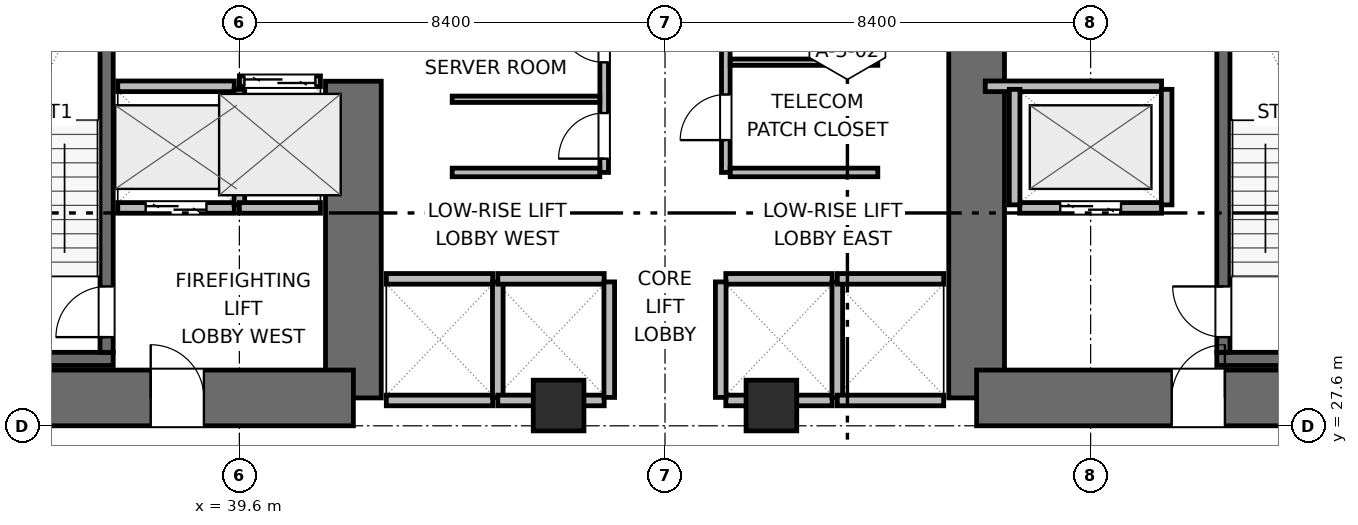
"""IFC4 building model, lengths in metres.
Left out: names, types, materials, properties, quantities, classifications, styles, units other than length and angle.
Written with IfcOpenShell. Run it as: python <this file> out.ifc"""

import sys

from ifc_helpers import new_model, si_unit, direction, frame, frame_2d, origin, origin_2d, place, context, subcontext, project, spatial, rectangle, extrude, element, fill, save


model = new_model("IFC4")
c1 = context("Model", 3, precision=1e-05, world=origin(), true_north=direction((0.0, 1.0)))
c2 = subcontext(c1, "Body", "Model", "MODEL_VIEW")
j1 = project(units=[si_unit("LENGTHUNIT", "METRE"), si_unit("PLANEANGLEUNIT", "RADIAN")], contexts=[c1])
p1 = place(None, origin())
s1 = spatial("IfcSite", under=j1, at=p1, CompositionType="ELEMENT")
p2 = place(p1, origin())
s2 = spatial("IfcBuilding", under=s1, at=p2, CompositionType="ELEMENT")
p3 = place(p2, frame((0.0, 0.0, 12.9)))
s3 = spatial("IfcBuildingStorey", under=s2, at=p3, CompositionType="ELEMENT", Elevation=12.9)
p4 = place(p3, frame((41.85, 28.15, 0.0), z_axis=(0.0, 0.0, 1.0), x_axis=(0.0, 1.0, 0.0)))
e1 = element("IfcWall", 1, at=p4, inside=s3, PredefinedType="SHEAR", context=c2, shape_type="SweptSolid", body=[
    extrude(rectangle(XDim=6.25, YDim=1.1, at=frame_2d((3.125, 0.0))), origin(), (0.0, 0.0, 1.0), 4.2),
])
p5 = place(p3, frame((32.95, 28.15, 0.0), z_axis=(0.0, 0.0, 1.0), x_axis=(1.0, 0.0, 0.0)))
e2 = element("IfcWall", 2, at=p5, inside=s3, PredefinedType="SHEAR", context=c2, shape_type="SweptSolid", body=[
    extrude(rectangle(XDim=8.9, YDim=1.1, at=frame_2d((4.45, 0.0))), origin(), (0.0, 0.0, 1.0), 4.2),
])
p6 = place(p5, frame((4.9, 0.0, 0.0)))
e3 = element("IfcOpeningElement", 3, at=p6, cuts=e2, PredefinedType="OPENING", context=c2, shape_type="SweptSolid", body=[
    extrude(rectangle(XDim=1.05, YDim=2.04, at=frame_2d((0.525, 1.02))), frame((0.0, 0.56, 0.0), z_axis=(0.0, -1.0, 0.0), x_axis=(1.0, 0.0, 0.0)), (0.0, 0.0, 1.0), 1.12),
])
p7 = place(p3, frame((54.15, 28.15, 0.0), z_axis=(0.0, 0.0, 1.0), x_axis=(0.0, 1.0, 0.0)))
e4 = element("IfcWall", 4, at=p7, inside=s3, PredefinedType="SHEAR", context=c2, shape_type="SweptSolid", body=[
    extrude(rectangle(XDim=7.65, YDim=1.1, at=frame_2d((3.825, 0.0))), origin(), (0.0, 0.0, 1.0), 4.2),
])
p8 = place(p3, frame((54.15, 28.15, 0.0), z_axis=(0.0, 0.0, 1.0), x_axis=(1.0, 0.0, 0.0)))
e5 = element("IfcWall", 5, at=p8, inside=s3, PredefinedType="SHEAR", context=c2, shape_type="SweptSolid", body=[
    extrude(rectangle(XDim=8.9, YDim=1.1, at=frame_2d((4.45, 0.0))), origin(), (0.0, 0.0, 1.0), 4.2),
])
p9 = place(p8, frame((3.85, 0.0, 0.0)))
e6 = element("IfcOpeningElement", 6, at=p9, cuts=e5, PredefinedType="OPENING", context=c2, shape_type="SweptSolid", body=[
    extrude(rectangle(XDim=1.05, YDim=2.04, at=frame_2d((0.525, 1.02))), frame((0.0, 0.56, 0.0), z_axis=(0.0, -1.0, 0.0), x_axis=(1.0, 0.0, 0.0)), (0.0, 0.0, 1.0), 1.12),
])
p10 = place(p3, frame((33.5, 28.92, 0.0), z_axis=(0.0, 0.0, 1.0), x_axis=(1.0, 0.0, 0.0)))
e7 = element("IfcWall", 7, at=p10, inside=s3, PredefinedType="SHEAR", context=c2, shape_type="SweptSolid", body=[
    extrude(rectangle(XDim=3.61, YDim=0.26, at=frame_2d((1.805, 0.0))), origin(), (0.0, 0.0, 1.0), 4.2),
])
p11 = place(p3, frame((36.98, 29.05, 0.0), z_axis=(0.0, 0.0, 1.0), x_axis=(0.0, 1.0, 0.0)))
e8 = element("IfcWall", 8, at=p11, inside=s3, PredefinedType="SHEAR", context=c2, shape_type="SweptSolid", body=[
    extrude(rectangle(XDim=7.6, YDim=0.26, at=frame_2d((3.8, 0.0))), origin(), (0.0, 0.0, 1.0), 4.2),
])
p12 = place(p11, frame((0.3, 0.0, 0.0)))
e9 = element("IfcOpeningElement", 9, at=p12, cuts=e8, PredefinedType="OPENING", context=c2, shape_type="SweptSolid", body=[
    extrude(rectangle(XDim=1.0, YDim=2.04, at=frame_2d((0.5, 1.02))), frame((0.0, 0.14, 0.0), z_axis=(0.0, -1.0, 0.0), x_axis=(1.0, 0.0, 0.0)), (0.0, 0.0, 1.0), 0.28),
])
p13 = place(p3, frame((58.89, 28.92, 0.0), z_axis=(0.0, 0.0, 1.0), x_axis=(1.0, 0.0, 0.0)))
e10 = element("IfcWall", 10, at=p13, inside=s3, PredefinedType="SHEAR", context=c2, shape_type="SweptSolid", body=[
    extrude(rectangle(XDim=3.61, YDim=0.26, at=frame_2d((1.805, 0.0))), origin(), (0.0, 0.0, 1.0), 4.2),
])
p14 = place(p3, frame((59.02, 29.05, 0.0), z_axis=(0.0, 0.0, 1.0), x_axis=(0.0, 1.0, 0.0)))
e11 = element("IfcWall", 11, at=p14, inside=s3, PredefinedType="SHEAR", context=c2, shape_type="SweptSolid", body=[
    extrude(rectangle(XDim=7.6, YDim=0.26, at=frame_2d((3.8, 0.0))), origin(), (0.0, 0.0, 1.0), 4.2),
])
p15 = place(p14, frame((0.3, 0.0, 0.0)))
e12 = element("IfcOpeningElement", 12, at=p15, cuts=e11, PredefinedType="OPENING", context=c2, shape_type="SweptSolid", body=[
    extrude(rectangle(XDim=1.0, YDim=2.04, at=frame_2d((0.5, 1.02))), frame((0.0, 0.14, 0.0), z_axis=(0.0, -1.0, 0.0), x_axis=(1.0, 0.0, 0.0)), (0.0, 0.0, 1.0), 0.28),
])
for number, where, z_axis, x_axis in (
    (13, (45.9, 28.0, 0.0), (0.0, 0.0, 1.0), (1.0, 0.0, 0.0)),
    (14, (50.1, 28.0, 0.0), (0.0, 0.0, 1.0), (1.0, 0.0, 0.0)),
):
    element("IfcColumn", number, at=place(p3, frame(where, z_axis=z_axis, x_axis=x_axis)), inside=s3, PredefinedType="COLUMN", context=c2, shape_type="SweptSolid", body=[
        extrude(rectangle(XDim=1.0, YDim=1.0, at=origin_2d()), origin(), (0.0, 0.0, 1.0), 4.2),
    ])
p16 = place(p3, frame((37.2, 31.9, 0.0), z_axis=(0.0, 0.0, 1.0), x_axis=(1.0, 0.0, 0.0)))
e15 = element("IfcWall", 15, at=p16, inside=s3, PredefinedType="PARTITIONING", context=c2, shape_type="SweptSolid", body=[
    extrude(rectangle(XDim=2.3, YDim=0.21, at=frame_2d((1.15, 0.0))), origin(), (0.0, 0.0, 1.0), 3.84),
])
p17 = place(p16, frame((0.55, 0.0, 0.0)))
e16 = element("IfcOpeningElement", 16, at=p17, cuts=e15, PredefinedType="OPENING", context=c2, shape_type="SweptSolid", body=[
    extrude(rectangle(XDim=1.2, YDim=2.04, at=frame_2d((0.6, 1.02))), frame((0.0, 0.115, 0.0), z_axis=(0.0, -1.0, 0.0), x_axis=(1.0, 0.0, 0.0)), (0.0, 0.0, 1.0), 0.23),
])
p18 = place(p3, frame((37.2, 34.3, 0.0), z_axis=(0.0, 0.0, 1.0), x_axis=(1.0, 0.0, 0.0)))
e17 = element("IfcWall", 17, at=p18, inside=s3, PredefinedType="PARTITIONING", context=c2, shape_type="SweptSolid", body=[
    extrude(rectangle(XDim=2.3, YDim=0.21, at=frame_2d((1.15, 0.0))), origin(), (0.0, 0.0, 1.0), 3.84),
])
p19 = place(p3, frame((39.6, 31.96, 0.0), z_axis=(0.0, 0.0, 1.0), x_axis=(0.0, 1.0, 0.0)))
e18 = element("IfcWall", 18, at=p19, inside=s3, PredefinedType="PARTITIONING", context=c2, shape_type="SweptSolid", body=[
    extrude(rectangle(XDim=2.28, YDim=0.21, at=frame_2d((1.14, 0.0))), origin(), (0.0, 0.0, 1.0), 3.84),
])
p20 = place(p3, frame((55.0, 31.9, 0.0), z_axis=(0.0, 0.0, 1.0), x_axis=(1.0, 0.0, 0.0)))
e19 = element("IfcWall", 19, at=p20, inside=s3, PredefinedType="PARTITIONING", context=c2, shape_type="SweptSolid", body=[
    extrude(rectangle(XDim=2.8, YDim=0.21, at=frame_2d((1.4, 0.0))), origin(), (0.0, 0.0, 1.0), 3.84),
])
p21 = place(p20, frame((0.8, 0.0, 0.0)))
e20 = element("IfcOpeningElement", 20, at=p21, cuts=e19, PredefinedType="OPENING", context=c2, shape_type="SweptSolid", body=[
    extrude(rectangle(XDim=1.2, YDim=2.04, at=frame_2d((0.6, 1.02))), frame((0.0, 0.115, 0.0), z_axis=(0.0, -1.0, 0.0), x_axis=(1.0, 0.0, 0.0)), (0.0, 0.0, 1.0), 0.23),
])
p22 = place(p3, frame((54.32, 34.3, 0.0), z_axis=(0.0, 0.0, 1.0), x_axis=(1.0, 0.0, 0.0)))
e21 = element("IfcWall", 21, at=p22, inside=s3, PredefinedType="PARTITIONING", context=c2, shape_type="SweptSolid", body=[
    extrude(rectangle(XDim=3.48, YDim=0.21, at=frame_2d((1.74, 0.0))), origin(), (0.0, 0.0, 1.0), 3.84),
])
for number, where, z_axis, x_axis in (
    (22, (54.9, 31.96, 0.0), (0.0, 0.0, 1.0), (0.0, 1.0, 0.0)),
    (23, (57.9, 31.96, 0.0), (0.0, 0.0, 1.0), (0.0, 1.0, 0.0)),
):
    element("IfcWall", number, at=place(p3, frame(where, z_axis=z_axis, x_axis=x_axis)), inside=s3, PredefinedType="PARTITIONING", context=c2, shape_type="SweptSolid", body=[
        extrude(rectangle(XDim=2.28, YDim=0.21, at=frame_2d((1.14, 0.0))), origin(), (0.0, 0.0, 1.0), 3.84),
    ])
p23 = place(p3, frame((39.6, 34.4, 0.0), z_axis=(0.0, 0.0, 1.0), x_axis=(1.0, 0.0, 0.0)))
e24 = element("IfcWall", 24, at=p23, inside=s3, PredefinedType="PARTITIONING", context=c2, shape_type="SweptSolid", body=[
    extrude(rectangle(XDim=1.6, YDim=0.21, at=frame_2d((0.8, 0.0))), origin(), (0.0, 0.0, 1.0), 3.84),
])
p24 = place(p23, frame((0.1, 0.0, 0.0)))
e25 = element("IfcOpeningElement", 25, at=p24, cuts=e24, PredefinedType="OPENING", context=c2, shape_type="SweptSolid", body=[
    extrude(rectangle(XDim=1.4, YDim=2.06, at=frame_2d((0.7, 1.03))), frame((0.0, 0.115, 0.0), z_axis=(0.0, -1.0, 0.0), x_axis=(1.0, 0.0, 0.0)), (0.0, 0.0, 1.0), 0.23),
])
p25 = place(p3, frame((39.6, 31.9, 0.0), z_axis=(0.0, 0.0, 1.0), x_axis=(1.0, 0.0, 0.0)))
e26 = element("IfcWall", 26, at=p25, inside=s3, PredefinedType="PARTITIONING", context=c2, shape_type="SweptSolid", body=[
    extrude(rectangle(XDim=1.6, YDim=0.21, at=frame_2d((0.8, 0.0))), origin(), (0.0, 0.0, 1.0), 3.84),
])
p26 = place(p3, frame((42.5, 30.5, 0.0), z_axis=(0.0, 0.0, 1.0), x_axis=(1.0, 0.0, 0.0)))
e27 = element("IfcWall", 27, at=p26, inside=s3, PredefinedType="PARTITIONING", context=c2, shape_type="SweptSolid", body=[
    extrude(rectangle(XDim=2.1, YDim=0.21, at=frame_2d((1.05, 0.0))), origin(), (0.0, 0.0, 1.0), 3.84),
])
p27 = place(p3, frame((42.5, 28.1, 0.0), z_axis=(0.0, 0.0, 1.0), x_axis=(1.0, 0.0, 0.0)))
e28 = element("IfcWall", 28, at=p27, inside=s3, PredefinedType="PARTITIONING", context=c2, shape_type="SweptSolid", body=[
    extrude(rectangle(XDim=2.1, YDim=0.21, at=frame_2d((1.05, 0.0))), origin(), (0.0, 0.0, 1.0), 2.725),
])
p28 = place(p3, frame((44.7, 28.16, 0.0), z_axis=(0.0, 0.0, 1.0), x_axis=(0.0, 1.0, 0.0)))
e29 = element("IfcWall", 29, at=p28, inside=s3, PredefinedType="PARTITIONING", context=c2, shape_type="SweptSolid", body=[
    extrude(rectangle(XDim=2.28, YDim=0.21, at=frame_2d((1.14, 0.0))), origin(), (0.0, 0.0, 1.0), 3.84),
])
p29 = place(p3, frame((44.7, 30.5, 0.0), z_axis=(0.0, 0.0, 1.0), x_axis=(1.0, 0.0, 0.0)))
e30 = element("IfcWall", 30, at=p29, inside=s3, PredefinedType="PARTITIONING", context=c2, shape_type="SweptSolid", body=[
    extrude(rectangle(XDim=2.1, YDim=0.21, at=frame_2d((1.05, 0.0))), origin(), (0.0, 0.0, 1.0), 3.84),
])
p30 = place(p3, frame((44.7, 28.1, 0.0), z_axis=(0.0, 0.0, 1.0), x_axis=(1.0, 0.0, 0.0)))
e31 = element("IfcWall", 31, at=p30, inside=s3, PredefinedType="PARTITIONING", context=c2, shape_type="SweptSolid", body=[
    extrude(rectangle(XDim=2.1, YDim=0.21, at=frame_2d((1.05, 0.0))), origin(), (0.0, 0.0, 1.0), 2.725),
])
p31 = place(p3, frame((46.9, 28.16, 0.0), z_axis=(0.0, 0.0, 1.0), x_axis=(0.0, 1.0, 0.0)))
e32 = element("IfcWall", 32, at=p31, inside=s3, PredefinedType="PARTITIONING", context=c2, shape_type="SweptSolid", body=[
    extrude(rectangle(XDim=2.28, YDim=0.21, at=frame_2d((1.14, 0.0))), origin(), (0.0, 0.0, 1.0), 3.84),
])
p32 = place(p3, frame((49.2, 30.5, 0.0), z_axis=(0.0, 0.0, 1.0), x_axis=(1.0, 0.0, 0.0)))
e33 = element("IfcWall", 33, at=p32, inside=s3, PredefinedType="PARTITIONING", context=c2, shape_type="SweptSolid", body=[
    extrude(rectangle(XDim=2.1, YDim=0.21, at=frame_2d((1.05, 0.0))), origin(), (0.0, 0.0, 1.0), 3.84),
])
p33 = place(p3, frame((49.2, 28.1, 0.0), z_axis=(0.0, 0.0, 1.0), x_axis=(1.0, 0.0, 0.0)))
e34 = element("IfcWall", 34, at=p33, inside=s3, PredefinedType="PARTITIONING", context=c2, shape_type="SweptSolid", body=[
    extrude(rectangle(XDim=2.1, YDim=0.21, at=frame_2d((1.05, 0.0))), origin(), (0.0, 0.0, 1.0), 2.725),
])
for number, where, z_axis, x_axis in (
    (35, (49.1, 28.16, 0.0), (0.0, 0.0, 1.0), (0.0, 1.0, 0.0)),
    (36, (51.4, 28.16, 0.0), (0.0, 0.0, 1.0), (0.0, 1.0, 0.0)),
):
    element("IfcWall", number, at=place(p3, frame(where, z_axis=z_axis, x_axis=x_axis)), inside=s3, PredefinedType="PARTITIONING", context=c2, shape_type="SweptSolid", body=[
        extrude(rectangle(XDim=2.28, YDim=0.21, at=frame_2d((1.14, 0.0))), origin(), (0.0, 0.0, 1.0), 3.84),
    ])
p34 = place(p3, frame((51.4, 30.5, 0.0), z_axis=(0.0, 0.0, 1.0), x_axis=(1.0, 0.0, 0.0)))
e37 = element("IfcWall", 37, at=p34, inside=s3, PredefinedType="PARTITIONING", context=c2, shape_type="SweptSolid", body=[
    extrude(rectangle(XDim=2.1, YDim=0.21, at=frame_2d((1.05, 0.0))), origin(), (0.0, 0.0, 1.0), 3.84),
])
p35 = place(p3, frame((51.4, 28.1, 0.0), z_axis=(0.0, 0.0, 1.0), x_axis=(1.0, 0.0, 0.0)))
e38 = element("IfcWall", 38, at=p35, inside=s3, PredefinedType="PARTITIONING", context=c2, shape_type="SweptSolid", body=[
    extrude(rectangle(XDim=2.1, YDim=0.21, at=frame_2d((1.05, 0.0))), origin(), (0.0, 0.0, 1.0), 2.725),
])
p36 = place(p3, frame((46.8, 32.6, 0.0), z_axis=(0.0, 0.0, 1.0), x_axis=(0.0, 1.0, 0.0)))
e39 = element("IfcWall", 39, at=p36, inside=s3, PredefinedType="PARTITIONING", context=c2, shape_type="SweptSolid", body=[
    extrude(rectangle(XDim=3.8, YDim=0.17, at=frame_2d((1.9, 0.0))), origin(), (0.0, 0.0, 1.0), 3.84),
])
p37 = place(p36, frame((0.272, 0.0, 0.0)))
e40 = element("IfcOpeningElement", 40, at=p37, cuts=e39, PredefinedType="OPENING", context=c2, shape_type="SweptSolid", body=[
    extrude(rectangle(XDim=0.9, YDim=2.02, at=frame_2d((0.45, 1.01))), frame((0.0, 0.095, 0.0), z_axis=(0.0, -1.0, 0.0), x_axis=(1.0, 0.0, 0.0)), (0.0, 0.0, 1.0), 0.19),
])
p38 = place(p36, frame((2.172, 0.0, 0.0)))
e41 = element("IfcOpeningElement", 41, at=p38, cuts=e39, PredefinedType="OPENING", context=c2, shape_type="SweptSolid", body=[
    extrude(rectangle(XDim=0.9, YDim=2.02, at=frame_2d((0.45, 1.01))), frame((0.0, 0.095, 0.0), z_axis=(0.0, -1.0, 0.0), x_axis=(1.0, 0.0, 0.0)), (0.0, 0.0, 1.0), 0.19),
])
p39 = place(p3, frame((43.8, 32.6, 0.0), z_axis=(0.0, 0.0, 1.0), x_axis=(1.0, 0.0, 0.0)))
e42 = element("IfcWall", 42, at=p39, inside=s3, PredefinedType="PARTITIONING", context=c2, shape_type="SweptSolid", body=[
    extrude(rectangle(XDim=2.913, YDim=0.17, at=frame_2d((1.457, 0.0))), origin(), (0.0, 0.0, 1.0), 3.84),
])
p40 = place(p3, frame((43.8, 34.044, 0.0), z_axis=(0.0, 0.0, 1.0), x_axis=(1.0, 0.0, 0.0)))
e43 = element("IfcWall", 43, at=p40, inside=s3, PredefinedType="PARTITIONING", context=c2, shape_type="SweptSolid", body=[
    extrude(rectangle(XDim=2.913, YDim=0.125, at=frame_2d((1.457, 0.0))), origin(), (0.0, 0.0, 1.0), 3.84),
])
p41 = place(p3, frame((49.2, 32.6, 0.0), z_axis=(0.0, 0.0, 1.0), x_axis=(0.0, 1.0, 0.0)))
e44 = element("IfcWall", 44, at=p41, inside=s3, PredefinedType="PARTITIONING", context=c2, shape_type="SweptSolid", body=[
    extrude(rectangle(XDim=3.4, YDim=0.17, at=frame_2d((1.7, 0.0))), origin(), (0.0, 0.0, 1.0), 3.84),
])
p42 = place(p41, frame((0.638, 0.0, 0.0)))
e45 = element("IfcOpeningElement", 45, at=p42, cuts=e44, PredefinedType="OPENING", context=c2, shape_type="SweptSolid", body=[
    extrude(rectangle(XDim=0.9, YDim=2.02, at=frame_2d((0.45, 1.01))), frame((0.0, 0.095, 0.0), z_axis=(0.0, -1.0, 0.0), x_axis=(1.0, 0.0, 0.0)), (0.0, 0.0, 1.0), 0.19),
])
p43 = place(p3, frame((49.287, 32.6, 0.0), z_axis=(0.0, 0.0, 1.0), x_axis=(1.0, 0.0, 0.0)))
e46 = element("IfcWall", 46, at=p43, inside=s3, PredefinedType="PARTITIONING", context=c2, shape_type="SweptSolid", body=[
    extrude(rectangle(XDim=2.913, YDim=0.17, at=frame_2d((1.457, 0.0))), origin(), (0.0, 0.0, 1.0), 3.84),
])
p44 = place(p3, frame((49.287, 34.776, 0.0), z_axis=(0.0, 0.0, 1.0), x_axis=(1.0, 0.0, 0.0)))
e47 = element("IfcWall", 47, at=p44, inside=s3, PredefinedType="PARTITIONING", context=c2, shape_type="SweptSolid", body=[
    extrude(rectangle(XDim=2.913, YDim=0.125, at=frame_2d((1.457, 0.0))), origin(), (0.0, 0.0, 1.0), 3.84),
])
p45 = place(p12, origin())
e48 = element("IfcDoor", 48, at=p45, inside=s3, OperationType="SINGLE_SWING_LEFT", PredefinedType="DOOR", context=c2, shape_type="SweptSolid", body=[
    extrude(rectangle(XDim=1.0, YDim=2.04, at=frame_2d((0.5, 1.02))), frame((0.0, 0.025, 0.0), z_axis=(0.0, -1.0, 0.0), x_axis=(1.0, 0.0, 0.0)), (0.0, 0.0, 1.0), 0.05),
])
fill(e9, e48)
p46 = place(p15, origin())
e49 = element("IfcDoor", 49, at=p46, inside=s3, OperationType="SINGLE_SWING_RIGHT", PredefinedType="DOOR", context=c2, shape_type="SweptSolid", body=[
    extrude(rectangle(XDim=1.0, YDim=2.04, at=frame_2d((0.5, 1.02))), frame((0.0, 0.025, 0.0), z_axis=(0.0, -1.0, 0.0), x_axis=(1.0, 0.0, 0.0)), (0.0, 0.0, 1.0), 0.05),
])
fill(e12, e49)
p47 = place(p17, origin())
e50 = element("IfcDoor", 50, at=p47, inside=s3, OperationType="DOUBLE_DOOR_SLIDING", PredefinedType="DOOR", context=c2, shape_type="SweptSolid", body=[
    extrude(rectangle(XDim=1.2, YDim=2.04, at=frame_2d((0.6, 1.02))), frame((0.0, 0.025, 0.0), z_axis=(0.0, -1.0, 0.0), x_axis=(1.0, 0.0, 0.0)), (0.0, 0.0, 1.0), 0.05),
])
fill(e16, e50)
p48 = place(p21, origin())
e51 = element("IfcDoor", 51, at=p48, inside=s3, OperationType="DOUBLE_DOOR_SLIDING", PredefinedType="DOOR", context=c2, shape_type="SweptSolid", body=[
    extrude(rectangle(XDim=1.2, YDim=2.04, at=frame_2d((0.6, 1.02))), frame((0.0, 0.025, 0.0), z_axis=(0.0, -1.0, 0.0), x_axis=(1.0, 0.0, 0.0)), (0.0, 0.0, 1.0), 0.05),
])
fill(e20, e51)
p49 = place(p24, origin())
e52 = element("IfcDoor", 52, at=p49, inside=s3, OperationType="DOUBLE_DOOR_SLIDING", PredefinedType="DOOR", context=c2, shape_type="SweptSolid", body=[
    extrude(rectangle(XDim=1.4, YDim=2.06, at=frame_2d((0.7, 1.03))), frame((0.0, 0.025, 0.0), z_axis=(0.0, -1.0, 0.0), x_axis=(1.0, 0.0, 0.0)), (0.0, 0.0, 1.0), 0.05),
])
fill(e25, e52)
p50 = place(p6, origin())
e53 = element("IfcDoor", 53, at=p50, inside=s3, OperationType="SINGLE_SWING_LEFT", PredefinedType="DOOR", context=c2, shape_type="SweptSolid", body=[
    extrude(rectangle(XDim=1.05, YDim=2.04, at=frame_2d((0.525, 1.02))), frame((0.0, 0.025, 0.0), z_axis=(0.0, -1.0, 0.0), x_axis=(1.0, 0.0, 0.0)), (0.0, 0.0, 1.0), 0.05),
])
fill(e3, e53)
p51 = place(p9, origin())
e54 = element("IfcDoor", 54, at=p51, inside=s3, OperationType="SINGLE_SWING_RIGHT", PredefinedType="DOOR", context=c2, shape_type="SweptSolid", body=[
    extrude(rectangle(XDim=1.05, YDim=2.04, at=frame_2d((0.525, 1.02))), frame((0.0, 0.025, 0.0), z_axis=(0.0, -1.0, 0.0), x_axis=(1.0, 0.0, 0.0)), (0.0, 0.0, 1.0), 0.05),
])
fill(e6, e54)
p52 = place(p37, origin())
e55 = element("IfcDoor", 55, at=p52, inside=s3, OperationType="SINGLE_SWING_LEFT", PredefinedType="DOOR", context=c2, shape_type="SweptSolid", body=[
    extrude(rectangle(XDim=0.9, YDim=2.02, at=frame_2d((0.45, 1.01))), frame((0.0, 0.025, 0.0), z_axis=(0.0, -1.0, 0.0), x_axis=(1.0, 0.0, 0.0)), (0.0, 0.0, 1.0), 0.05),
])
fill(e40, e55)
p53 = place(p38, origin())
e56 = element("IfcDoor", 56, at=p53, inside=s3, OperationType="SINGLE_SWING_RIGHT", PredefinedType="DOOR", context=c2, shape_type="SweptSolid", body=[
    extrude(rectangle(XDim=0.9, YDim=2.02, at=frame_2d((0.45, 1.01))), frame((0.0, 0.025, 0.0), z_axis=(0.0, -1.0, 0.0), x_axis=(1.0, 0.0, 0.0)), (0.0, 0.0, 1.0), 0.05),
])
fill(e41, e56)
p54 = place(p42, origin())
e57 = element("IfcDoor", 57, at=p54, inside=s3, OperationType="SINGLE_SWING_LEFT", PredefinedType="DOOR", context=c2, shape_type="SweptSolid", body=[
    extrude(rectangle(XDim=0.9, YDim=2.02, at=frame_2d((0.45, 1.01))), frame((0.0, 0.025, 0.0), z_axis=(0.0, -1.0, 0.0), x_axis=(1.0, 0.0, 0.0)), (0.0, 0.0, 1.0), 0.05),
])
fill(e45, e57)
save(model, sys.argv[1])
